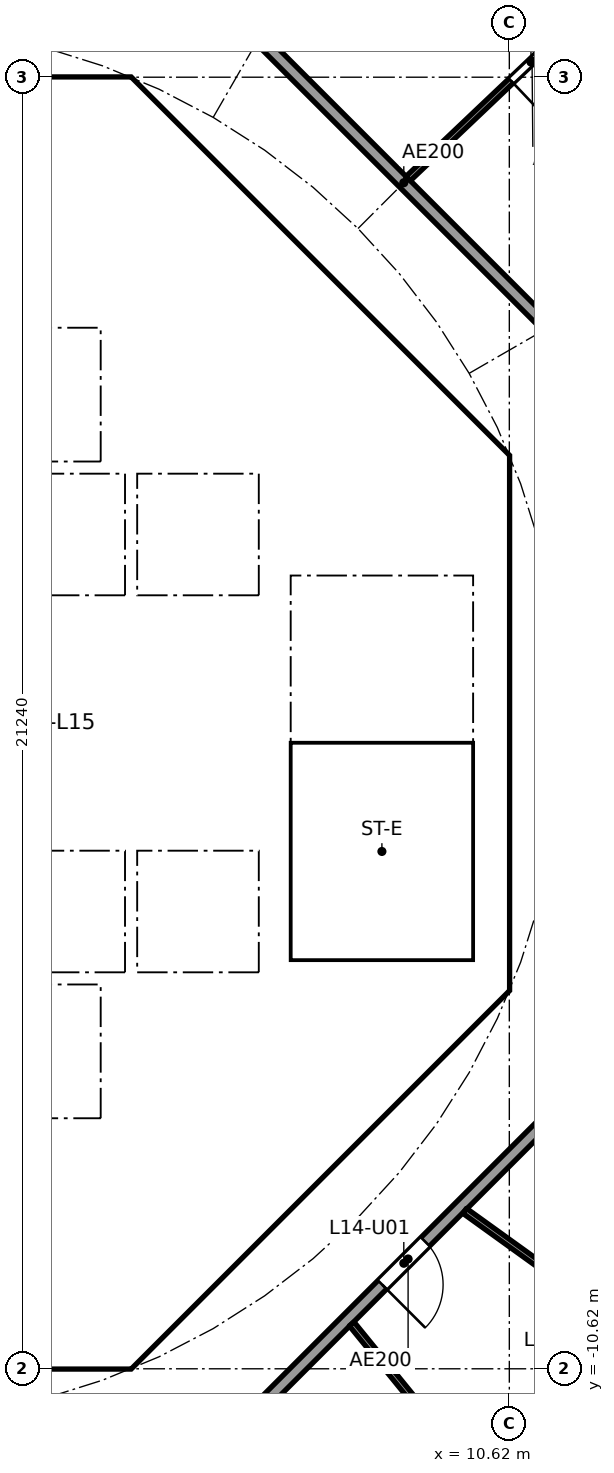
"""IFC4 building model, lengths in metres.
Left out: names, types, materials, properties, quantities, classifications, styles, units other than length and angle.
Written with IfcOpenShell. Run it as: python <this file> out.ifc"""

import sys

from ifc_helpers import new_model, si_unit, direction, frame, frame_2d, origin, place, context, subcontext, project, spatial, polyline, rectangle, outline, extrude, element, fill, save


model = new_model("IFC4")
c1 = context("Model", 3, precision=1e-05, world=origin(), true_north=direction((0.0, 1.0)))
c2 = subcontext(c1, "Body", "Model", "MODEL_VIEW")
j1 = project(units=[si_unit("LENGTHUNIT", "METRE"), si_unit("PLANEANGLEUNIT", "RADIAN")], contexts=[c1])
p1 = place(None, origin())
s1 = spatial("IfcSite", under=j1, at=p1, CompositionType="ELEMENT")
p2 = place(p1, origin())
s2 = spatial("IfcBuilding", under=s1, at=p2, CompositionType="ELEMENT")
p3 = place(p2, frame((0.0, 0.0, 60.3)))
s3 = spatial("IfcBuildingStorey", under=s2, at=p3, CompositionType="ELEMENT", Elevation=60.3)
p4 = place(p3, frame((9.988, 4.613, 0.0), z_axis=(0.0, 0.0, 1.0), x_axis=(-0.707106781187, 0.707106781187, 0.0)))
e1 = element("IfcWall", 1, at=p4, inside=s3, PredefinedType="SHEAR", context=c2, shape_type="SweptSolid", body=[
    extrude(rectangle(XDim=7.602, YDim=0.6, at=frame_2d((3.801, 0.0))), origin(), (0.0, 0.0, 1.0), 3.44),
])
p5 = place(p4, frame((3.201, 0.0, 0.0)))
e2 = element("IfcOpeningElement", 2, at=p5, cuts=e1, PredefinedType="OPENING", context=c2, shape_type="SweptSolid", body=[
    extrude(rectangle(XDim=1.2, YDim=2.1, at=frame_2d((0.6, 1.05))), frame((0.0, 0.31, 0.0), z_axis=(0.0, -1.0, 0.0), x_axis=(1.0, 0.0, 0.0)), (0.0, 0.0, 1.0), 0.62),
])
p6 = place(p3, frame((4.613, -9.988, 0.0), z_axis=(0.0, 0.0, 1.0), x_axis=(0.707106781187, 0.707106781187, 0.0)))
e3 = element("IfcWall", 3, at=p6, inside=s3, PredefinedType="SHEAR", context=c2, shape_type="SweptSolid", body=[
    extrude(rectangle(XDim=7.602, YDim=0.6, at=frame_2d((3.801, 0.0))), origin(), (0.0, 0.0, 1.0), 3.44),
])
p7 = place(p6, frame((3.201, 0.0, 0.0)))
e4 = element("IfcOpeningElement", 4, at=p7, cuts=e3, PredefinedType="OPENING", context=c2, shape_type="SweptSolid", body=[
    extrude(rectangle(XDim=1.2, YDim=2.1, at=frame_2d((0.6, 1.05))), frame((0.0, 0.31, 0.0), z_axis=(0.0, -1.0, 0.0), x_axis=(1.0, 0.0, 0.0)), (0.0, 0.0, 1.0), 0.62),
])
p8 = place(p3, frame((4.0, 4.3, 0.0), z_axis=(0.0, 0.0, 1.0), x_axis=(0.0, 1.0, 0.0)))
e5 = element("IfcWall", 5, at=p8, inside=s3, PredefinedType="SOLIDWALL", context=c2, shape_type="SweptSolid", body=[
    extrude(rectangle(XDim=2.2, YDim=0.2, at=frame_2d((1.1, 0.0))), origin(), (0.0, 0.0, 1.0), 3.44),
])
p9 = place(p8, frame((0.55, 0.0, 0.0)))
e6 = element("IfcOpeningElement", 6, at=p9, cuts=e5, PredefinedType="OPENING", context=c2, shape_type="SweptSolid", body=[
    extrude(rectangle(XDim=1.1, YDim=2.1, at=frame_2d((0.55, 1.05))), frame((0.0, 0.11, 0.0), z_axis=(0.0, -1.0, 0.0), x_axis=(1.0, 0.0, 0.0)), (0.0, 0.0, 1.0), 0.22),
])
p10 = place(p3, frame((-6.7, 2.0, 0.0), z_axis=(0.0, 0.0, 1.0), x_axis=(1.0, 0.0, 0.0)))
e7 = element("IfcWall", 7, at=p10, inside=s3, PredefinedType="SOLIDWALL", context=c2, shape_type="SweptSolid", body=[
    extrude(rectangle(XDim=13.4, YDim=0.2, at=frame_2d((6.7, 0.0))), origin(), (0.0, 0.0, 1.0), 3.44),
])
p11 = place(p10, frame((0.65, 0.0, 0.0)))
e8 = element("IfcOpeningElement", 8, at=p11, cuts=e7, PredefinedType="OPENING", context=c2, shape_type="SweptSolid", body=[
    extrude(rectangle(XDim=1.1, YDim=2.1, at=frame_2d((0.55, 1.05))), frame((0.0, 0.11, 0.0), z_axis=(0.0, -1.0, 0.0), x_axis=(1.0, 0.0, 0.0)), (0.0, 0.0, 1.0), 0.22),
])
p12 = place(p10, frame((2.85, 0.0, 0.0)))
e9 = element("IfcOpeningElement", 9, at=p12, cuts=e7, PredefinedType="OPENING", context=c2, shape_type="SweptSolid", body=[
    extrude(rectangle(XDim=1.1, YDim=2.1, at=frame_2d((0.55, 1.05))), frame((0.0, 0.11, 0.0), z_axis=(0.0, -1.0, 0.0), x_axis=(1.0, 0.0, 0.0)), (0.0, 0.0, 1.0), 0.22),
])
p13 = place(p10, frame((5.05, 0.0, 0.0)))
e10 = element("IfcOpeningElement", 10, at=p13, cuts=e7, PredefinedType="OPENING", context=c2, shape_type="SweptSolid", body=[
    extrude(rectangle(XDim=1.1, YDim=2.1, at=frame_2d((0.55, 1.05))), frame((0.0, 0.11, 0.0), z_axis=(0.0, -1.0, 0.0), x_axis=(1.0, 0.0, 0.0)), (0.0, 0.0, 1.0), 0.22),
])
p14 = place(p3, frame((6.7, 4.0, 0.0), z_axis=(0.0, 0.0, 1.0), x_axis=(1.0, 0.0, 0.0)))
e11 = element("IfcWall", 11, at=p14, inside=s3, PredefinedType="SOLIDWALL", context=c2, shape_type="SweptSolid", body=[
    extrude(rectangle(XDim=3.325, YDim=0.2, at=frame_2d((1.662, 0.0))), origin(), (0.0, 0.0, 1.0), 3.44),
])
p15 = place(p14, frame((1.25, 0.0, 0.0)))
e12 = element("IfcOpeningElement", 12, at=p15, cuts=e11, PredefinedType="OPENING", context=c2, shape_type="SweptSolid", body=[
    extrude(rectangle(XDim=1.1, YDim=2.1, at=frame_2d((0.55, 1.05))), frame((0.0, 0.11, 0.0), z_axis=(0.0, -1.0, 0.0), x_axis=(1.0, 0.0, 0.0)), (0.0, 0.0, 1.0), 0.22),
])
p16 = place(p3, frame((4.0, 7.025, 0.0), z_axis=(0.0, 0.0, 1.0), x_axis=(0.0, 1.0, 0.0)))
e13 = element("IfcWall", 13, at=p16, inside=s3, PredefinedType="SOLIDWALL", context=c2, shape_type="SweptSolid", body=[
    extrude(rectangle(XDim=3.0, YDim=0.2, at=frame_2d((1.5, 0.0))), origin(), (0.0, 0.0, 1.0), 3.44),
])
p17 = place(p16, frame((0.925, 0.0, 0.0)))
e14 = element("IfcOpeningElement", 14, at=p17, cuts=e13, PredefinedType="OPENING", context=c2, shape_type="SweptSolid", body=[
    extrude(rectangle(XDim=1.1, YDim=2.1, at=frame_2d((0.55, 1.05))), frame((0.0, 0.11, 0.0), z_axis=(0.0, -1.0, 0.0), x_axis=(1.0, 0.0, 0.0)), (0.0, 0.0, 1.0), 0.22),
])
p18 = place(p3, frame((4.0, -10.025, 0.0), z_axis=(0.0, 0.0, 1.0), x_axis=(0.0, 1.0, 0.0)))
e15 = element("IfcWall", 15, at=p18, inside=s3, PredefinedType="SOLIDWALL", context=c2, shape_type="SweptSolid", body=[
    extrude(rectangle(XDim=3.0, YDim=0.2, at=frame_2d((1.5, 0.0))), origin(), (0.0, 0.0, 1.0), 3.44),
])
p19 = place(p18, frame((0.975, 0.0, 0.0)))
e16 = element("IfcOpeningElement", 16, at=p19, cuts=e15, PredefinedType="OPENING", context=c2, shape_type="SweptSolid", body=[
    extrude(rectangle(XDim=1.1, YDim=2.1, at=frame_2d((0.55, 1.05))), frame((0.0, 0.11, 0.0), z_axis=(0.0, -1.0, 0.0), x_axis=(1.0, 0.0, 0.0)), (0.0, 0.0, 1.0), 0.22),
])
p20 = place(p3, frame((4.0, -6.5, 0.0), z_axis=(0.0, 0.0, 1.0), x_axis=(0.0, 1.0, 0.0)))
e17 = element("IfcWall", 17, at=p20, inside=s3, PredefinedType="SOLIDWALL", context=c2, shape_type="SweptSolid", body=[
    extrude(rectangle(XDim=2.2, YDim=0.2, at=frame_2d((1.1, 0.0))), origin(), (0.0, 0.0, 1.0), 3.44),
])
p21 = place(p20, frame((0.55, 0.0, 0.0)))
e18 = element("IfcOpeningElement", 18, at=p21, cuts=e17, PredefinedType="OPENING", context=c2, shape_type="SweptSolid", body=[
    extrude(rectangle(XDim=1.1, YDim=2.1, at=frame_2d((0.55, 1.05))), frame((0.0, 0.11, 0.0), z_axis=(0.0, -1.0, 0.0), x_axis=(1.0, 0.0, 0.0)), (0.0, 0.0, 1.0), 0.22),
])
p22 = place(p3, frame((-6.7, -2.0, 0.0), z_axis=(0.0, 0.0, 1.0), x_axis=(1.0, 0.0, 0.0)))
e19 = element("IfcWall", 19, at=p22, inside=s3, PredefinedType="SOLIDWALL", context=c2, shape_type="SweptSolid", body=[
    extrude(rectangle(XDim=13.4, YDim=0.2, at=frame_2d((6.7, 0.0))), origin(), (0.0, 0.0, 1.0), 3.44),
])
p23 = place(p22, frame((0.65, 0.0, 0.0)))
e20 = element("IfcOpeningElement", 20, at=p23, cuts=e19, PredefinedType="OPENING", context=c2, shape_type="SweptSolid", body=[
    extrude(rectangle(XDim=1.1, YDim=2.1, at=frame_2d((0.55, 1.05))), frame((0.0, 0.11, 0.0), z_axis=(0.0, -1.0, 0.0), x_axis=(1.0, 0.0, 0.0)), (0.0, 0.0, 1.0), 0.22),
])
p24 = place(p22, frame((2.85, 0.0, 0.0)))
e21 = element("IfcOpeningElement", 21, at=p24, cuts=e19, PredefinedType="OPENING", context=c2, shape_type="SweptSolid", body=[
    extrude(rectangle(XDim=1.1, YDim=2.1, at=frame_2d((0.55, 1.05))), frame((0.0, 0.11, 0.0), z_axis=(0.0, -1.0, 0.0), x_axis=(1.0, 0.0, 0.0)), (0.0, 0.0, 1.0), 0.22),
])
p25 = place(p3, origin())
e22 = element("IfcWall", 22, at=p25, inside=s3, PredefinedType="SHEAR", context=c2, shape_type="SweptSolid", body=[
    extrude(outline(polyline([(-4.152, -10.025), (4.152, -10.025), (4.401, -9.776), (4.825, -10.2), (4.401, -10.625), (-4.401, -10.625), (-4.825, -10.2), (-4.401, -9.776), (-4.152, -10.025)])), origin(), (0.0, 0.0, 1.0), 3.44),
])
p26 = place(p3, origin())
e23 = element("IfcWall", 23, at=p26, inside=s3, PredefinedType="SHEAR", context=c2, shape_type="SweptSolid", body=[
    extrude(outline(polyline([(-4.152, 10.025), (-4.401, 9.776), (-4.825, 10.2), (-4.401, 10.625), (4.401, 10.625), (4.825, 10.2), (4.401, 9.776), (4.152, 10.025), (-4.152, 10.025)])), origin(), (0.0, 0.0, 1.0), 3.44),
])
p27 = place(p3, origin())
e24 = element("IfcWall", 24, at=p27, inside=s3, PredefinedType="SHEAR", context=c2, shape_type="SweptSolid", body=[
    extrude(outline(polyline([(9.776, -4.401), (10.025, -4.152), (10.025, -3.801), (10.025, 4.152), (9.776, 4.401), (10.2, 4.825), (10.625, 4.401), (10.625, -4.401), (10.2, -4.825), (9.776, -4.401)])), origin(), (0.0, 0.0, 1.0), 3.44),
])
p28 = place(p3, origin())
e25 = element("IfcWall", 25, at=p28, inside=s3, PredefinedType="SOLIDWALL", context=c2, shape_type="SweptSolid", body=[
    extrude(outline(polyline([(-6.7, -2.1), (-6.5, -2.1), (-6.5, -4.1), (-4.5, -4.1), (-4.5, -2.1), (-4.3, -2.1), (-4.3, -4.1), (-2.3, -4.1), (-2.3, -2.1), (-2.1, -2.1), (-2.1, -4.1), (-0.1, -4.1), (-0.1, -2.1), (0.1, -2.1), (0.1, -4.1), (2.1, -4.1), (2.1, -2.1), (2.3, -2.1), (2.3, -4.1), (4.3, -4.1), (4.3, -2.1), (4.5, -2.1), (4.5, -4.1), (6.5, -4.1), (6.5, -2.1), (6.7, -2.1), (6.7, -4.3), (-6.7, -4.3), (-6.7, -2.1)])), origin(), (0.0, 0.0, 1.0), 3.44),
])
p29 = place(p3, origin())
e26 = element("IfcWall", 26, at=p29, inside=s3, PredefinedType="SOLIDWALL", context=c2, shape_type="SweptSolid", body=[
    extrude(outline(polyline([(-6.5, 2.1), (-6.7, 2.1), (-6.7, 4.3), (6.7, 4.3), (6.7, 2.1), (6.5, 2.1), (6.5, 4.1), (4.5, 4.1), (4.5, 2.1), (4.3, 2.1), (4.3, 4.1), (2.3, 4.1), (2.3, 2.1), (2.1, 2.1), (2.1, 4.1), (0.1, 4.1), (0.1, 2.1), (-0.1, 2.1), (-0.1, 4.1), (-2.1, 4.1), (-2.1, 2.1), (-2.3, 2.1), (-2.3, 4.1), (-4.3, 4.1), (-4.3, 2.1), (-4.5, 2.1), (-4.5, 4.1), (-6.5, 4.1), (-6.5, 2.1)])), origin(), (0.0, 0.0, 1.0), 3.44),
])
p30 = place(p3, origin())
e27 = element("IfcWall", 27, at=p30, inside=s3, PredefinedType="SOLIDWALL", context=c2, shape_type="SweptSolid", body=[
    extrude(outline(polyline([(4.1, -7.025), (-4.1, -7.025), (-4.1, -6.5), (4.1, -6.5), (4.1, -7.025)])), origin(), (0.0, 0.0, 1.0), 3.44),
])
p31 = place(p3, origin())
e28 = element("IfcWall", 28, at=p31, inside=s3, PredefinedType="SOLIDWALL", context=c2, shape_type="SweptSolid", body=[
    extrude(outline(polyline([(4.1, 6.5), (-4.1, 6.5), (-4.1, 7.025), (4.1, 7.025), (4.1, 6.5)])), origin(), (0.0, 0.0, 1.0), 3.44),
])
p32 = place(p3, origin())
e29 = element("IfcWall", 29, at=p32, inside=s3, PredefinedType="SOLIDWALL", context=c2, shape_type="SweptSolid", body=[
    extrude(outline(polyline([(7.025, -3.9), (6.7, -3.9), (6.7, 3.9), (7.025, 3.9), (7.025, -3.9)])), origin(), (0.0, 0.0, 1.0), 3.44),
])
p33 = place(p3, origin())
e30 = element("IfcWall", 30, at=p33, inside=s3, PredefinedType="SOLIDWALL", context=c2, shape_type="SweptSolid", body=[
    extrude(outline(polyline([(10.025, -4.1), (6.7, -4.1), (6.7, -3.9), (10.025, -3.9), (10.025, -4.1)])), origin(), (0.0, 0.0, 1.0), 3.44),
])
p34 = place(p3, frame((12.635, 5.134, 0.0), z_axis=(0.0, 0.0, 1.0), x_axis=(-0.707106781187, 0.707106781187, 0.0)))
e31 = element("IfcWall", 31, at=p34, inside=s3, PredefinedType="PARTITIONING", context=c2, shape_type="SweptSolid", body=[
    extrude(rectangle(XDim=10.609, YDim=0.2, at=frame_2d((5.305, 0.0))), origin(), (0.0, 0.0, 1.0), 3.44),
])
p35 = place(p3, frame((5.275, -12.494, 0.0), z_axis=(0.0, 0.0, 1.0), x_axis=(0.707106781187, 0.707106781187, 0.0)))
e32 = element("IfcWall", 32, at=p35, inside=s3, PredefinedType="PARTITIONING", context=c2, shape_type="SweptSolid", body=[
    extrude(rectangle(XDim=10.409, YDim=0.2, at=frame_2d((5.205, 0.0))), origin(), (0.0, 0.0, 1.0), 3.44),
])
p36 = place(p35, frame((4.604, 0.0, 0.0)))
e33 = element("IfcOpeningElement", 33, at=p36, cuts=e32, PredefinedType="OPENING", context=c2, shape_type="SweptSolid", body=[
    extrude(rectangle(XDim=1.0, YDim=2.1, at=frame_2d((0.5, 1.05))), frame((0.0, 0.11, 0.0), z_axis=(0.0, -1.0, 0.0), x_axis=(1.0, 0.0, 0.0)), (0.0, 0.0, 1.0), 0.22),
])
p37 = place(p3, frame((8.957, 8.953, 0.0), z_axis=(0.0, 0.0, 1.0), x_axis=(0.725253319157, 0.688482115273, 0.0)))
e34 = element("IfcWall", 34, at=p37, inside=s3, PredefinedType="PARTITIONING", context=c2, shape_type="SweptSolid", body=[
    extrude(rectangle(XDim=5.617, YDim=0.1, at=frame_2d((2.809, 0.0))), origin(), (0.0, 0.0, 1.0), 2.687),
])
p38 = place(p37, frame((2.333, 0.0, 0.0)))
e35 = element("IfcOpeningElement", 35, at=p38, cuts=e34, PredefinedType="OPENING", context=c2, shape_type="SweptSolid", body=[
    extrude(rectangle(XDim=0.9, YDim=2.1, at=frame_2d((0.45, 1.05))), frame((0.0, 0.06, 0.0), z_axis=(0.0, -1.0, 0.0), x_axis=(1.0, 0.0, 0.0)), (0.0, 0.0, 1.0), 0.12),
])
p39 = place(p3, frame((8.028, -9.882, 0.0), z_axis=(0.0, 0.0, 1.0), x_axis=(0.631035554955, -0.77575390968, 0.0)))
e36 = element("IfcWall", 36, at=p39, inside=s3, PredefinedType="PARTITIONING", context=c2, shape_type="SweptSolid", body=[
    extrude(rectangle(XDim=12.759, YDim=0.1, at=frame_2d((6.379, 0.0))), origin(), (0.0, 0.0, 1.0), 2.687),
])
p40 = place(p39, frame((2.311, 0.0, 0.0)))
e37 = element("IfcOpeningElement", 37, at=p40, cuts=e36, PredefinedType="OPENING", context=c2, shape_type="SweptSolid", body=[
    extrude(rectangle(XDim=0.9, YDim=2.1, at=frame_2d((0.45, 1.05))), frame((0.0, 0.06, 0.0), z_axis=(0.0, -1.0, 0.0), x_axis=(1.0, 0.0, 0.0)), (0.0, 0.0, 1.0), 0.12),
])
p41 = place(p39, frame((8.69, 0.0, 0.0)))
e38 = element("IfcOpeningElement", 38, at=p41, cuts=e36, PredefinedType="OPENING", context=c2, shape_type="SweptSolid", body=[
    extrude(rectangle(XDim=0.9, YDim=2.1, at=frame_2d((0.45, 1.05))), frame((0.0, 0.06, 0.0), z_axis=(0.0, -1.0, 0.0), x_axis=(1.0, 0.0, 0.0)), (0.0, 0.0, 1.0), 0.12),
])
p42 = place(p3, frame((9.886, -8.023, 0.0), z_axis=(0.0, 0.0, 1.0), x_axis=(0.811615973871, -0.58419133078, 0.0)))
e39 = element("IfcWall", 39, at=p42, inside=s3, PredefinedType="PARTITIONING", context=c2, shape_type="SweptSolid", body=[
    extrude(rectangle(XDim=12.535, YDim=0.1, at=frame_2d((6.268, 0.0))), origin(), (0.0, 0.0, 1.0), 2.687),
])
p43 = place(p42, frame((2.262, 0.0, 0.0)))
e40 = element("IfcOpeningElement", 40, at=p43, cuts=e39, PredefinedType="OPENING", context=c2, shape_type="SweptSolid", body=[
    extrude(rectangle(XDim=0.9, YDim=2.1, at=frame_2d((0.45, 1.05))), frame((0.0, 0.06, 0.0), z_axis=(0.0, -1.0, 0.0), x_axis=(1.0, 0.0, 0.0)), (0.0, 0.0, 1.0), 0.12),
])
p44 = place(p42, frame((8.53, 0.0, 0.0)))
e41 = element("IfcOpeningElement", 41, at=p44, cuts=e39, PredefinedType="OPENING", context=c2, shape_type="SweptSolid", body=[
    extrude(rectangle(XDim=0.9, YDim=2.1, at=frame_2d((0.45, 1.05))), frame((0.0, 0.06, 0.0), z_axis=(0.0, -1.0, 0.0), x_axis=(1.0, 0.0, 0.0)), (0.0, 0.0, 1.0), 0.12),
])
p45 = place(p9, origin())
e42 = element("IfcDoor", 42, at=p45, inside=s3, OperationType="DOUBLE_DOOR_SLIDING", PredefinedType="DOOR", context=c2, shape_type="SweptSolid", body=[
    extrude(rectangle(XDim=1.1, YDim=2.1, at=frame_2d((0.55, 1.05))), frame((0.0, 0.025, 0.0), z_axis=(0.0, -1.0, 0.0), x_axis=(1.0, 0.0, 0.0)), (0.0, 0.0, 1.0), 0.05),
])
fill(e6, e42)
p46 = place(p21, origin())
e43 = element("IfcDoor", 43, at=p46, inside=s3, OperationType="DOUBLE_DOOR_SLIDING", PredefinedType="DOOR", context=c2, shape_type="SweptSolid", body=[
    extrude(rectangle(XDim=1.1, YDim=2.1, at=frame_2d((0.55, 1.05))), frame((0.0, 0.025, 0.0), z_axis=(0.0, -1.0, 0.0), x_axis=(1.0, 0.0, 0.0)), (0.0, 0.0, 1.0), 0.05),
])
fill(e18, e43)
p47 = place(p15, frame((1.1, 0.0, 0.0), x_axis=(-1.0, 0.0, 0.0)))
e44 = element("IfcDoor", 44, at=p47, inside=s3, OperationType="SINGLE_SWING_RIGHT", PredefinedType="DOOR", context=c2, shape_type="SweptSolid", body=[
    extrude(rectangle(XDim=1.1, YDim=2.1, at=frame_2d((0.55, 1.05))), frame((0.0, 0.025, 0.0), z_axis=(0.0, -1.0, 0.0), x_axis=(1.0, 0.0, 0.0)), (0.0, 0.0, 1.0), 0.05),
])
fill(e12, e44)
p48 = place(p17, origin())
e45 = element("IfcDoor", 45, at=p48, inside=s3, OperationType="SINGLE_SWING_LEFT", PredefinedType="DOOR", context=c2, shape_type="SweptSolid", body=[
    extrude(rectangle(XDim=1.1, YDim=2.1, at=frame_2d((0.55, 1.05))), frame((0.0, 0.025, 0.0), z_axis=(0.0, -1.0, 0.0), x_axis=(1.0, 0.0, 0.0)), (0.0, 0.0, 1.0), 0.05),
])
fill(e14, e45)
p49 = place(p19, origin())
e46 = element("IfcDoor", 46, at=p49, inside=s3, OperationType="SINGLE_SWING_RIGHT", PredefinedType="DOOR", context=c2, shape_type="SweptSolid", body=[
    extrude(rectangle(XDim=1.1, YDim=2.1, at=frame_2d((0.55, 1.05))), frame((0.0, 0.025, 0.0), z_axis=(0.0, -1.0, 0.0), x_axis=(1.0, 0.0, 0.0)), (0.0, 0.0, 1.0), 0.05),
])
fill(e16, e46)
p50 = place(p5, origin())
e47 = element("IfcDoor", 47, at=p50, inside=s3, OperationType="SINGLE_SWING_RIGHT", PredefinedType="DOOR", context=c2, shape_type="SweptSolid", body=[
    extrude(rectangle(XDim=1.2, YDim=2.1, at=frame_2d((0.6, 1.05))), frame((0.0, 0.025, 0.0), z_axis=(0.0, -1.0, 0.0), x_axis=(1.0, 0.0, 0.0)), (0.0, 0.0, 1.0), 0.05),
])
fill(e2, e47)
p51 = place(p7, origin())
e48 = element("IfcDoor", 48, at=p51, inside=s3, OperationType="SINGLE_SWING_RIGHT", PredefinedType="DOOR", context=c2, shape_type="SweptSolid", body=[
    extrude(rectangle(XDim=1.2, YDim=2.1, at=frame_2d((0.6, 1.05))), frame((0.0, 0.025, 0.0), z_axis=(0.0, -1.0, 0.0), x_axis=(1.0, 0.0, 0.0)), (0.0, 0.0, 1.0), 0.05),
])
fill(e4, e48)
p52 = place(p36, frame((1.0, 0.0, 0.0), x_axis=(-1.0, 0.0, 0.0)))
e49 = element("IfcDoor", 49, at=p52, inside=s3, OperationType="SINGLE_SWING_RIGHT", PredefinedType="DOOR", context=c2, shape_type="SweptSolid", body=[
    extrude(rectangle(XDim=1.0, YDim=2.1, at=frame_2d((0.5, 1.05))), frame((0.0, 0.025, 0.0), z_axis=(0.0, -1.0, 0.0), x_axis=(1.0, 0.0, 0.0)), (0.0, 0.0, 1.0), 0.05),
])
fill(e33, e49)
p53 = place(p38, frame((0.9, 0.0, 0.0), x_axis=(-1.0, 0.0, 0.0)))
e50 = element("IfcDoor", 50, at=p53, inside=s3, OperationType="SINGLE_SWING_RIGHT", PredefinedType="DOOR", context=c2, shape_type="SweptSolid", body=[
    extrude(rectangle(XDim=0.9, YDim=2.1, at=frame_2d((0.45, 1.05))), frame((0.0, 0.025, 0.0), z_axis=(0.0, -1.0, 0.0), x_axis=(1.0, 0.0, 0.0)), (0.0, 0.0, 1.0), 0.05),
])
fill(e35, e50)
save(model, sys.argv[1])
